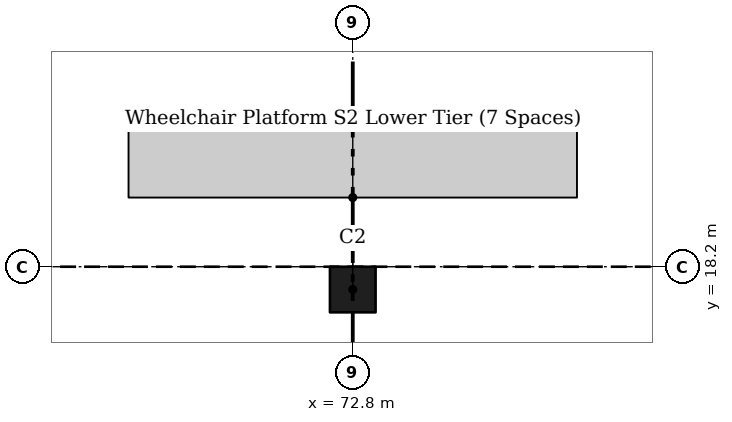
"""IFC4 building model, lengths in metres.
Left out: names, types, materials, properties, quantities, classifications, styles, units other than length and angle.
Written with IfcOpenShell. Run it as: python <this file> out.ifc"""

import sys

from ifc_helpers import new_model, si_unit, direction, frame, origin, origin_2d, place, context, subcontext, project, spatial, rectangle, extrude, element, save


model = new_model("IFC4")
c1 = context("Model", 3, precision=1e-05, world=origin(), true_north=direction((0.0, 1.0)))
c2 = subcontext(c1, "Body", "Model", "MODEL_VIEW")
j1 = project(units=[si_unit("LENGTHUNIT", "METRE"), si_unit("PLANEANGLEUNIT", "RADIAN")], contexts=[c1])
p1 = place(None, origin())
s1 = spatial("IfcSite", under=j1, at=p1, CompositionType="ELEMENT")
p2 = place(p1, origin())
s2 = spatial("IfcBuilding", under=s1, at=p2, CompositionType="ELEMENT")
p3 = place(p2, frame((0.0, 0.0, 6.37)))
s3 = spatial("IfcBuildingStorey", under=s2, at=p3, CompositionType="ELEMENT", Elevation=6.37)
p4 = place(p3, frame((72.8, 17.9, 0.0), z_axis=(0.0, 0.0, 1.0), x_axis=(1.0, 0.0, 0.0)))
e1 = element("IfcColumn", 1, at=p4, inside=s3, PredefinedType="COLUMN", context=c2, shape_type="SweptSolid", body=[
    extrude(rectangle(XDim=0.6, YDim=0.6, at=origin_2d()), origin(), (0.0, 0.0, 1.0), 4.55),
])
save(model, sys.argv[1])
